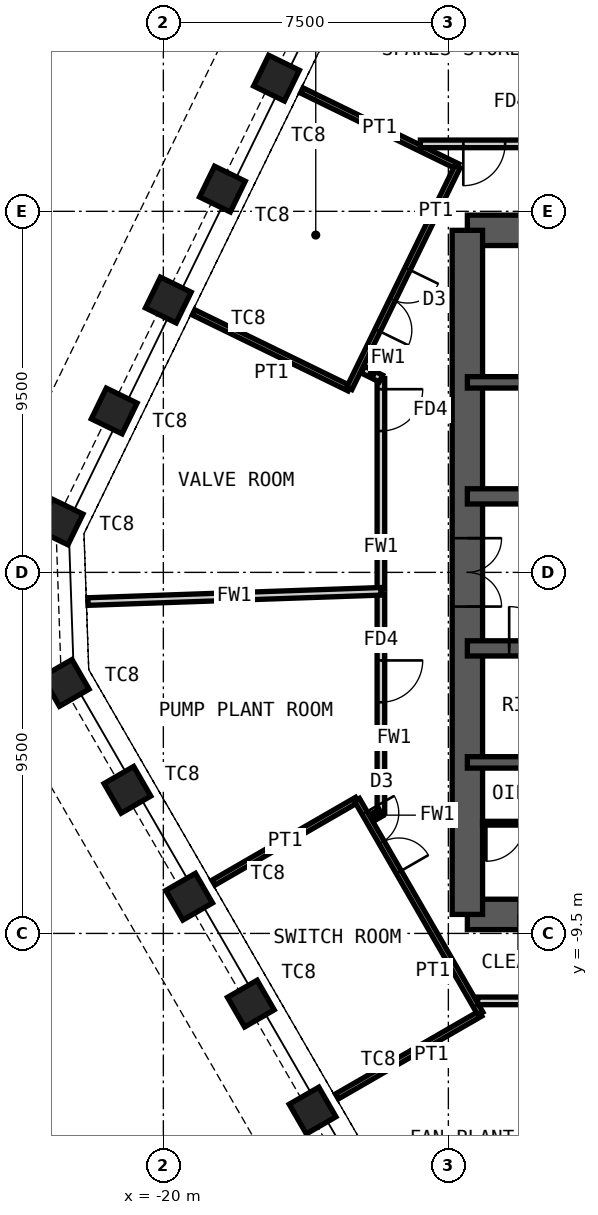
"""IFC4 building model, lengths in metres.
Left out: names, types, materials, properties, quantities, classifications, styles, units other than length and angle.
Written with IfcOpenShell. Run it as: python <this file> out.ifc"""

import sys

from ifc_helpers import new_model, si_unit, direction, frame, frame_2d, origin, origin_2d, place, context, subcontext, project, spatial, rectangle, hollow_rectangle, extrude, element, fill, save


model = new_model("IFC4")
c1 = context("Model", 3, precision=1e-05, world=origin(), true_north=direction((0.0, 1.0)))
c2 = subcontext(c1, "Body", "Model", "MODEL_VIEW")
j1 = project(units=[si_unit("LENGTHUNIT", "METRE"), si_unit("PLANEANGLEUNIT", "RADIAN")], contexts=[c1])
p1 = place(None, origin())
s1 = spatial("IfcSite", under=j1, at=p1, CompositionType="ELEMENT")
p2 = place(p1, origin())
s2 = spatial("IfcBuilding", under=s1, at=p2, CompositionType="ELEMENT")
p3 = place(p2, frame((0.0, 0.0, 337.6)))
s3 = spatial("IfcBuildingStorey", under=s2, at=p3, CompositionType="ELEMENT", Elevation=337.6)
for number, where, z_axis, x_axis in (
    (1, (-16.073, -14.16, 0.0), (0.0, 0.0, 1.0), (0.5, -0.866, 0.0)),
    (2, (-17.698, -11.347, 0.0), (0.0, 0.0, 1.0), (0.5, -0.866, 0.0)),
    (3, (-19.322, -8.534, 0.0), (0.0, 0.0, 1.0), (0.5, -0.866, 0.0)),
    (4, (-20.946, -5.721, 0.0), (0.0, 0.0, 1.0), (0.5, -0.866, 0.0)),
    (5, (-22.57, -2.908, 0.0), (0.0, 0.0, 1.0), (0.5, -0.866, 0.0)),
    (6, (-22.717, 1.327, 0.0), (0.0, 0.0, 1.0), (-0.438, -0.899, 0.0)),
    (7, (-21.293, 4.246, 0.0), (0.0, 0.0, 1.0), (-0.438, -0.899, 0.0)),
    (8, (-19.87, 7.166, 0.0), (0.0, 0.0, 1.0), (-0.438, -0.899, 0.0)),
    (9, (-18.446, 10.085, 0.0), (0.0, 0.0, 1.0), (-0.438, -0.899, 0.0)),
    (10, (-17.022, 13.004, 0.0), (0.0, 0.0, 1.0), (-0.438, -0.899, 0.0)),
):
    element("IfcColumn", number, at=place(p3, frame(where, z_axis=z_axis, x_axis=x_axis)), inside=s3, PredefinedType="COLUMN", context=c2, shape_type="SweptSolid", body=[
        extrude(hollow_rectangle(XDim=0.9, YDim=0.9, WallThickness=0.05, at=origin_2d()), origin(), (0.0, 0.0, 1.0), 6.0),
    ])
p4 = place(p3, frame((-12.0, 9.0, 0.0), z_axis=(0.0, 0.0, 1.0), x_axis=(1.0, 0.0, 0.0)))
e11 = element("IfcWall", 11, at=p4, inside=s3, PredefinedType="SHEAR", context=c2, shape_type="SweptSolid", body=[
    extrude(rectangle(XDim=24.0, YDim=0.8, at=frame_2d((12.0, 0.0))), origin(), (0.0, 0.0, 1.0), 6.0),
])
p5 = place(p4, frame((10.4, 0.0, 0.0)))
e12 = element("IfcOpeningElement", 12, at=p5, cuts=e11, PredefinedType="OPENING", context=c2, shape_type="SweptSolid", body=[
    extrude(rectangle(XDim=1.0, YDim=2.1, at=frame_2d((0.5, 1.05))), frame((0.0, 0.41, 0.0), z_axis=(0.0, -1.0, 0.0), x_axis=(1.0, 0.0, 0.0)), (0.0, 0.0, 1.0), 0.82),
])
p6 = place(p4, frame((17.6, 0.0, 0.0)))
e13 = element("IfcOpeningElement", 13, at=p6, cuts=e11, PredefinedType="OPENING", context=c2, shape_type="SweptSolid", body=[
    extrude(rectangle(XDim=0.9, YDim=2.1, at=frame_2d((0.45, 1.05))), frame((0.0, 0.41, 0.0), z_axis=(0.0, -1.0, 0.0), x_axis=(1.0, 0.0, 0.0)), (0.0, 0.0, 1.0), 0.82),
])
p7 = place(p4, frame((21.9, 0.0, 0.0)))
e14 = element("IfcOpeningElement", 14, at=p7, cuts=e11, PredefinedType="OPENING", context=c2, shape_type="SweptSolid", body=[
    extrude(rectangle(XDim=0.9, YDim=2.1, at=frame_2d((0.45, 1.05))), frame((0.0, 0.41, 0.0), z_axis=(0.0, -1.0, 0.0), x_axis=(1.0, 0.0, 0.0)), (0.0, 0.0, 1.0), 0.82),
])
p8 = place(p3, frame((-12.0, -9.0, 0.0), z_axis=(0.0, 0.0, 1.0), x_axis=(1.0, 0.0, 0.0)))
e15 = element("IfcWall", 15, at=p8, inside=s3, PredefinedType="SHEAR", context=c2, shape_type="SweptSolid", body=[
    extrude(rectangle(XDim=24.0, YDim=0.8, at=frame_2d((12.0, 0.0))), origin(), (0.0, 0.0, 1.0), 6.0),
])
p9 = place(p8, frame((1.35, 0.0, 0.0)))
e16 = element("IfcOpeningElement", 16, at=p9, cuts=e15, PredefinedType="OPENING", context=c2, shape_type="SweptSolid", body=[
    extrude(rectangle(XDim=1.0, YDim=2.1, at=frame_2d((0.5, 1.05))), frame((0.0, 0.41, 0.0), z_axis=(0.0, -1.0, 0.0), x_axis=(1.0, 0.0, 0.0)), (0.0, 0.0, 1.0), 0.82),
])
p10 = place(p8, frame((5.325, 0.0, 0.0)))
e17 = element("IfcOpeningElement", 17, at=p10, cuts=e15, PredefinedType="OPENING", context=c2, shape_type="SweptSolid", body=[
    extrude(rectangle(XDim=1.15, YDim=2.1, at=frame_2d((0.575, 1.05))), frame((0.0, 0.41, 0.0), z_axis=(0.0, -1.0, 0.0), x_axis=(1.0, 0.0, 0.0)), (0.0, 0.0, 1.0), 0.82),
])
p11 = place(p8, frame((12.6, 0.0, 0.0)))
e18 = element("IfcOpeningElement", 18, at=p11, cuts=e15, PredefinedType="OPENING", context=c2, shape_type="SweptSolid", body=[
    extrude(rectangle(XDim=1.0, YDim=2.1, at=frame_2d((0.5, 1.05))), frame((0.0, 0.41, 0.0), z_axis=(0.0, -1.0, 0.0), x_axis=(1.0, 0.0, 0.0)), (0.0, 0.0, 1.0), 0.82),
])
p12 = place(p3, frame((-12.0, -9.0, 0.0), z_axis=(0.0, 0.0, 1.0), x_axis=(0.0, 1.0, 0.0)))
e19 = element("IfcWall", 19, at=p12, inside=s3, PredefinedType="SHEAR", context=c2, shape_type="SweptSolid", body=[
    extrude(rectangle(XDim=18.0, YDim=0.8, at=frame_2d((9.0, 0.0))), origin(), (0.0, 0.0, 1.0), 6.0),
])
p13 = place(p12, frame((8.1, 0.0, 0.0)))
e20 = element("IfcOpeningElement", 20, at=p13, cuts=e19, PredefinedType="OPENING", context=c2, shape_type="SweptSolid", body=[
    extrude(rectangle(XDim=1.8, YDim=2.1, at=frame_2d((0.9, 1.05))), frame((0.0, 0.41, 0.0), z_axis=(0.0, -1.0, 0.0), x_axis=(1.0, 0.0, 0.0)), (0.0, 0.0, 1.0), 0.82),
])
p14 = place(p3, frame((-12.0, 5.0, 0.0), z_axis=(0.0, 0.0, 1.0), x_axis=(1.0, 0.0, 0.0)))
e21 = element("IfcWall", 21, at=p14, inside=s3, PredefinedType="SHEAR", context=c2, shape_type="SweptSolid", body=[
    extrude(rectangle(XDim=24.0, YDim=0.3, at=frame_2d((12.0, 0.0))), origin(), (0.0, 0.0, 1.0), 6.0),
])
p15 = place(p3, frame((-12.0, 2.0, 0.0), z_axis=(0.0, 0.0, 1.0), x_axis=(1.0, 0.0, 0.0)))
e22 = element("IfcWall", 22, at=p15, inside=s3, PredefinedType="SHEAR", context=c2, shape_type="SweptSolid", body=[
    extrude(rectangle(XDim=24.0, YDim=0.4, at=frame_2d((12.0, 0.0))), origin(), (0.0, 0.0, 1.0), 6.0),
])
p16 = place(p15, frame((2.4, 0.0, 0.0)))
e23 = element("IfcOpeningElement", 23, at=p16, cuts=e22, PredefinedType="OPENING", context=c2, shape_type="SweptSolid", body=[
    extrude(rectangle(XDim=1.1, YDim=2.1, at=frame_2d((0.55, 1.05))), frame((0.0, 0.21, 0.0), z_axis=(0.0, -1.0, 0.0), x_axis=(1.0, 0.0, 0.0)), (0.0, 0.0, 1.0), 0.42),
])
p17 = place(p15, frame((22.0, 0.0, 0.0)))
e24 = element("IfcOpeningElement", 24, at=p17, cuts=e22, PredefinedType="OPENING", context=c2, shape_type="SweptSolid", body=[
    extrude(rectangle(XDim=1.1, YDim=2.1, at=frame_2d((0.55, 1.05))), frame((0.0, 0.21, 0.0), z_axis=(0.0, -1.0, 0.0), x_axis=(1.0, 0.0, 0.0)), (0.0, 0.0, 1.0), 0.42),
])
p18 = place(p15, frame((10.15, 0.0, 0.0)))
e25 = element("IfcOpeningElement", 25, at=p18, cuts=e22, PredefinedType="OPENING", context=c2, shape_type="SweptSolid", body=[
    extrude(rectangle(XDim=1.0, YDim=2.1, at=frame_2d((0.5, 1.05))), frame((0.0, 0.21, 0.0), z_axis=(0.0, -1.0, 0.0), x_axis=(1.0, 0.0, 0.0)), (0.0, 0.0, 1.0), 0.42),
])
p19 = place(p15, frame((6.9, 0.0, 0.0)))
e26 = element("IfcOpeningElement", 26, at=p19, cuts=e22, PredefinedType="OPENING", context=c2, shape_type="SweptSolid", body=[
    extrude(rectangle(XDim=1.0, YDim=2.1, at=frame_2d((0.5, 1.05))), frame((0.0, 0.21, 0.0), z_axis=(0.0, -1.0, 0.0), x_axis=(1.0, 0.0, 0.0)), (0.0, 0.0, 1.0), 0.42),
])
p20 = place(p15, frame((19.0, 0.0, 0.0)))
e27 = element("IfcOpeningElement", 27, at=p20, cuts=e22, PredefinedType="OPENING", context=c2, shape_type="SweptSolid", body=[
    extrude(rectangle(XDim=1.0, YDim=2.1, at=frame_2d((0.5, 1.05))), frame((0.0, 0.21, 0.0), z_axis=(0.0, -1.0, 0.0), x_axis=(1.0, 0.0, 0.0)), (0.0, 0.0, 1.0), 0.42),
])
p21 = place(p3, frame((-12.0, -2.0, 0.0), z_axis=(0.0, 0.0, 1.0), x_axis=(1.0, 0.0, 0.0)))
e28 = element("IfcWall", 28, at=p21, inside=s3, PredefinedType="SHEAR", context=c2, shape_type="SweptSolid", body=[
    extrude(rectangle(XDim=24.0, YDim=0.4, at=frame_2d((12.0, 0.0))), origin(), (0.0, 0.0, 1.0), 6.0),
])
p22 = place(p21, frame((1.1, 0.0, 0.0)))
e29 = element("IfcOpeningElement", 29, at=p22, cuts=e28, PredefinedType="OPENING", context=c2, shape_type="SweptSolid", body=[
    extrude(rectangle(XDim=1.1, YDim=2.1, at=frame_2d((0.55, 1.05))), frame((0.0, 0.21, 0.0), z_axis=(0.0, -1.0, 0.0), x_axis=(1.0, 0.0, 0.0)), (0.0, 0.0, 1.0), 0.42),
])
p23 = place(p21, frame((13.55, 0.0, 0.0)))
e30 = element("IfcOpeningElement", 30, at=p23, cuts=e28, PredefinedType="OPENING", context=c2, shape_type="SweptSolid", body=[
    extrude(rectangle(XDim=1.1, YDim=2.1, at=frame_2d((0.55, 1.05))), frame((0.0, 0.21, 0.0), z_axis=(0.0, -1.0, 0.0), x_axis=(1.0, 0.0, 0.0)), (0.0, 0.0, 1.0), 0.42),
])
p24 = place(p21, frame((20.7, 0.0, 0.0)))
e31 = element("IfcOpeningElement", 31, at=p24, cuts=e28, PredefinedType="OPENING", context=c2, shape_type="SweptSolid", body=[
    extrude(rectangle(XDim=1.1, YDim=2.1, at=frame_2d((0.55, 1.05))), frame((0.0, 0.21, 0.0), z_axis=(0.0, -1.0, 0.0), x_axis=(1.0, 0.0, 0.0)), (0.0, 0.0, 1.0), 0.42),
])
p25 = place(p21, frame((4.0, 0.0, 0.0)))
e32 = element("IfcOpeningElement", 32, at=p25, cuts=e28, PredefinedType="OPENING", context=c2, shape_type="SweptSolid", body=[
    extrude(rectangle(XDim=1.0, YDim=2.1, at=frame_2d((0.5, 1.05))), frame((0.0, 0.21, 0.0), z_axis=(0.0, -1.0, 0.0), x_axis=(1.0, 0.0, 0.0)), (0.0, 0.0, 1.0), 0.42),
])
p26 = place(p21, frame((6.8, 0.0, 0.0)))
e33 = element("IfcOpeningElement", 33, at=p26, cuts=e28, PredefinedType="OPENING", context=c2, shape_type="SweptSolid", body=[
    extrude(rectangle(XDim=1.0, YDim=2.1, at=frame_2d((0.5, 1.05))), frame((0.0, 0.21, 0.0), z_axis=(0.0, -1.0, 0.0), x_axis=(1.0, 0.0, 0.0)), (0.0, 0.0, 1.0), 0.42),
])
p27 = place(p21, frame((9.6, 0.0, 0.0)))
e34 = element("IfcOpeningElement", 34, at=p27, cuts=e28, PredefinedType="OPENING", context=c2, shape_type="SweptSolid", body=[
    extrude(rectangle(XDim=1.0, YDim=2.1, at=frame_2d((0.5, 1.05))), frame((0.0, 0.21, 0.0), z_axis=(0.0, -1.0, 0.0), x_axis=(1.0, 0.0, 0.0)), (0.0, 0.0, 1.0), 0.42),
])
p28 = place(p3, frame((-12.0, -5.0, 0.0), z_axis=(0.0, 0.0, 1.0), x_axis=(1.0, 0.0, 0.0)))
e35 = element("IfcWall", 35, at=p28, inside=s3, PredefinedType="SHEAR", context=c2, shape_type="SweptSolid", body=[
    extrude(rectangle(XDim=24.0, YDim=0.3, at=frame_2d((12.0, 0.0))), origin(), (0.0, 0.0, 1.0), 6.0),
])
p29 = place(p3, frame((-11.6, -6.6, 0.0), z_axis=(0.0, 0.0, 1.0), x_axis=(1.0, 0.0, 0.0)))
e36 = element("IfcWall", 36, at=p29, inside=s3, PredefinedType="PARTITIONING", context=c2, shape_type="SweptSolid", body=[
    extrude(rectangle(XDim=3.25, YDim=0.1, at=frame_2d((1.625, 0.0))), origin(), (0.0, 0.0, 1.0), 5.78),
])
p30 = place(p29, frame((0.1, 0.0, 0.0)))
e37 = element("IfcOpeningElement", 37, at=p30, cuts=e36, PredefinedType="OPENING", context=c2, shape_type="SweptSolid", body=[
    extrude(rectangle(XDim=1.0, YDim=2.4, at=frame_2d((0.5, 1.2))), frame((0.0, 0.06, 0.0), z_axis=(0.0, -1.0, 0.0), x_axis=(1.0, 0.0, 0.0)), (0.0, 0.0, 1.0), 0.12),
])
for number, where, z_axis, x_axis in (
    (38, (-15.433, -13.79, 0.0), (0.0, 0.0, 1.0), (0.866, 0.5, 0.0)),
    (39, (-18.681, -8.164, 0.0), (0.0, 0.0, 1.0), (0.866, 0.5, 0.0)),
):
    element("IfcWall", number, at=place(p3, frame(where, z_axis=z_axis, x_axis=x_axis)), inside=s3, PredefinedType="PARTITIONING", context=c2, shape_type="SweptSolid", body=[
        extrude(rectangle(XDim=4.36, YDim=0.15, at=frame_2d((2.18, 0.0))), origin(), (0.0, 0.0, 1.0), 4.65),
    ])
p31 = place(p3, frame((-11.657, -11.61, 0.0), z_axis=(0.0, 0.0, 1.0), x_axis=(-0.500003318956, 0.866023487576, 0.0)))
e40 = element("IfcWall", 40, at=p31, inside=s3, PredefinedType="PARTITIONING", context=c2, shape_type="SweptSolid", body=[
    extrude(rectangle(XDim=6.496, YDim=0.15, at=frame_2d((3.248, 0.0))), origin(), (0.0, 0.0, 1.0), 5.75),
])
p32 = place(p31, frame((4.297, 0.0, 0.0)))
e41 = element("IfcOpeningElement", 41, at=p32, cuts=e40, PredefinedType="OPENING", context=c2, shape_type="SweptSolid", body=[
    extrude(rectangle(XDim=1.8, YDim=2.4, at=frame_2d((0.9, 1.2))), frame((0.0, 0.085, 0.0), z_axis=(0.0, -1.0, 0.0), x_axis=(1.0, 0.0, 0.0)), (0.0, 0.0, 1.0), 0.17),
])
p33 = place(p3, frame((-19.205, 6.841, 0.0), z_axis=(0.0, 0.0, 1.0), x_axis=(0.898784911103, -0.438389876221, 0.0)))
e42 = element("IfcWall", 42, at=p33, inside=s3, PredefinedType="PARTITIONING", context=c2, shape_type="SweptSolid", body=[
    extrude(rectangle(XDim=4.56, YDim=0.15, at=frame_2d((2.28, 0.0))), origin(), (0.0, 0.0, 1.0), 4.65),
])
p34 = place(p3, frame((-16.357, 12.68, 0.0), z_axis=(0.0, 0.0, 1.0), x_axis=(0.898795200085, -0.438368781171, 0.0)))
e43 = element("IfcWall", 43, at=p34, inside=s3, PredefinedType="PARTITIONING", context=c2, shape_type="SweptSolid", body=[
    extrude(rectangle(XDim=4.56, YDim=0.15, at=frame_2d((2.28, 0.0))), origin(), (0.0, 0.0, 1.0), 4.85),
])
p35 = place(p3, frame((-15.106, 4.842, 0.0), z_axis=(0.0, 0.0, 1.0), x_axis=(0.438397716114, 0.898781087087, 0.0)))
e44 = element("IfcWall", 44, at=p35, inside=s3, PredefinedType="PARTITIONING", context=c2, shape_type="SweptSolid", body=[
    extrude(rectangle(XDim=6.496, YDim=0.15, at=frame_2d((3.248, 0.0))), origin(), (0.0, 0.0, 1.0), 5.75),
])
p36 = place(p35, frame((1.698, 0.0, 0.0)))
e45 = element("IfcOpeningElement", 45, at=p36, cuts=e44, PredefinedType="OPENING", context=c2, shape_type="SweptSolid", body=[
    extrude(rectangle(XDim=1.8, YDim=2.4, at=frame_2d((0.9, 1.2))), frame((0.0, 0.085, 0.0), z_axis=(0.0, -1.0, 0.0), x_axis=(1.0, 0.0, 0.0)), (0.0, 0.0, 1.0), 0.17),
])
p37 = place(p3, frame((-14.275, -6.32, 0.0), z_axis=(0.0, 0.0, 1.0), x_axis=(0.0, 1.0, 0.0)))
e46 = element("IfcWall", 46, at=p37, inside=s3, PredefinedType="PARTITIONING", context=c2, shape_type="SweptSolid", body=[
    extrude(rectangle(XDim=5.755, YDim=0.2, at=frame_2d((2.877, 0.0))), origin(), (0.0, 0.0, 1.0), 5.75),
])
p38 = place(p37, frame((2.903, 0.0, 0.0)))
e47 = element("IfcOpeningElement", 47, at=p38, cuts=e46, PredefinedType="OPENING", context=c2, shape_type="SweptSolid", body=[
    extrude(rectangle(XDim=1.1, YDim=2.1, at=frame_2d((0.55, 1.05))), frame((0.0, 0.11, 0.0), z_axis=(0.0, -1.0, 0.0), x_axis=(1.0, 0.0, 0.0)), (0.0, 0.0, 1.0), 0.22),
])
p39 = place(p3, frame((-14.275, -6.32, 0.0), z_axis=(0.0, 0.0, 1.0), x_axis=(-0.866140847338, -0.499799992569, 0.0)))
e48 = element("IfcWall", 48, at=p39, inside=s3, PredefinedType="PARTITIONING", context=c2, shape_type="SweptSolid", body=[
    extrude(rectangle(XDim=0.272, YDim=0.2, at=frame_2d((0.136, 0.0))), origin(), (0.0, 0.0, 1.0), 5.75),
])
p40 = place(p3, frame((-6.074, -11.275, 0.0), z_axis=(0.0, 0.0, 1.0), x_axis=(-1.0, 0.0, 0.0)))
e49 = element("IfcWall", 49, at=p40, inside=s3, PredefinedType="PARTITIONING", context=c2, shape_type="SweptSolid", body=[
    extrude(rectangle(XDim=5.655, YDim=0.2, at=frame_2d((2.827, 0.0))), origin(), (0.0, 0.0, 1.0), 5.75),
])
p41 = place(p40, frame((3.408, 0.0, 0.0)))
e50 = element("IfcOpeningElement", 50, at=p41, cuts=e49, PredefinedType="OPENING", context=c2, shape_type="SweptSolid", body=[
    extrude(rectangle(XDim=1.1, YDim=2.1, at=frame_2d((0.55, 1.05))), frame((0.0, 0.11, 0.0), z_axis=(0.0, -1.0, 0.0), x_axis=(1.0, 0.0, 0.0)), (0.0, 0.0, 1.0), 0.22),
])
p42 = place(p3, frame((-13.237, 11.275, 0.0), z_axis=(0.0, 0.0, 1.0), x_axis=(1.0, 0.0, 0.0)))
e51 = element("IfcWall", 51, at=p42, inside=s3, PredefinedType="PARTITIONING", context=c2, shape_type="SweptSolid", body=[
    extrude(rectangle(XDim=6.109, YDim=0.2, at=frame_2d((3.054, 0.0))), origin(), (0.0, 0.0, 1.0), 5.75),
])
p43 = place(p42, frame((1.13, 0.0, 0.0)))
e52 = element("IfcOpeningElement", 52, at=p43, cuts=e51, PredefinedType="OPENING", context=c2, shape_type="SweptSolid", body=[
    extrude(rectangle(XDim=1.1, YDim=2.1, at=frame_2d((0.55, 1.05))), frame((0.0, 0.11, 0.0), z_axis=(0.0, -1.0, 0.0), x_axis=(1.0, 0.0, 0.0)), (0.0, 0.0, 1.0), 0.22),
])
p44 = place(p3, frame((-14.275, -0.432, 0.0), z_axis=(0.0, 0.0, 1.0), x_axis=(0.0, 1.0, 0.0)))
e53 = element("IfcWall", 53, at=p44, inside=s3, PredefinedType="PARTITIONING", context=c2, shape_type="SweptSolid", body=[
    extrude(rectangle(XDim=5.532, YDim=0.2, at=frame_2d((2.766, 0.0))), origin(), (0.0, 0.0, 1.0), 5.75),
])
p45 = place(p44, frame((4.152, 0.0, 0.0)))
e54 = element("IfcOpeningElement", 54, at=p45, cuts=e53, PredefinedType="OPENING", context=c2, shape_type="SweptSolid", body=[
    extrude(rectangle(XDim=1.1, YDim=2.1, at=frame_2d((0.55, 1.05))), frame((0.0, 0.11, 0.0), z_axis=(0.0, -1.0, 0.0), x_axis=(1.0, 0.0, 0.0)), (0.0, 0.0, 1.0), 0.22),
])
p46 = place(p3, frame((-14.275, 5.1, 0.0), z_axis=(0.0, 0.0, 1.0), x_axis=(-0.894980101655, 0.446106060979, 0.0)))
e55 = element("IfcWall", 55, at=p46, inside=s3, PredefinedType="PARTITIONING", context=c2, shape_type="SweptSolid", body=[
    extrude(rectangle(XDim=0.529, YDim=0.2, at=frame_2d((0.265, 0.0))), origin(), (0.0, 0.0, 1.0), 4.65),
])
p47 = place(p3, frame((-5.995, -11.275, 0.0), z_axis=(0.0, 0.0, 1.0), x_axis=(-0.4694648611, -0.882951156176, 0.0)))
e56 = element("IfcWall", 56, at=p47, inside=s3, PredefinedType="PARTITIONING", context=c2, shape_type="SweptSolid", body=[
    extrude(rectangle(XDim=10.088, YDim=0.2, at=frame_2d((5.044, 0.0))), origin(), (0.0, 0.0, 1.0), 5.75),
])
p48 = place(p3, frame((-14.275, -0.499, 0.0), z_axis=(0.0, 0.0, 1.0), x_axis=(-0.999390758133, -0.034901469295, 0.0)))
e57 = element("IfcWall", 57, at=p48, inside=s3, PredefinedType="PARTITIONING", context=c2, shape_type="SweptSolid", body=[
    extrude(rectangle(XDim=7.716, YDim=0.2, at=frame_2d((3.858, 0.0))), origin(), (0.0, 0.0, 1.0), 5.75),
])
p49 = place(p3, frame((-7.045, 11.275, 0.0), z_axis=(0.0, 0.0, 1.0), x_axis=(-0.529918611936, 0.848048503756, 0.0)))
e58 = element("IfcWall", 58, at=p49, inside=s3, PredefinedType="PARTITIONING", context=c2, shape_type="SweptSolid", body=[
    extrude(rectangle(XDim=9.562, YDim=0.2, at=frame_2d((4.781, 0.0))), origin(), (0.0, 0.0, 1.0), 5.75),
])
p50 = place(p22, origin())
e59 = element("IfcDoor", 59, at=p50, inside=s3, OperationType="SINGLE_SWING_RIGHT", PredefinedType="DOOR", context=c2, shape_type="SweptSolid", body=[
    extrude(rectangle(XDim=1.1, YDim=2.1, at=frame_2d((0.55, 1.05))), frame((0.0, 0.025, 0.0), z_axis=(0.0, -1.0, 0.0), x_axis=(1.0, 0.0, 0.0)), (0.0, 0.0, 1.0), 0.05),
])
fill(e29, e59)
p51 = place(p13, origin())
e60 = element("IfcDoor", 60, at=p51, inside=s3, OperationType="DOUBLE_DOOR_DOUBLE_SWING", PredefinedType="DOOR", context=c2, shape_type="SweptSolid", body=[
    extrude(rectangle(XDim=1.8, YDim=2.1, at=frame_2d((0.9, 1.05))), frame((0.0, 0.025, 0.0), z_axis=(0.0, -1.0, 0.0), x_axis=(1.0, 0.0, 0.0)), (0.0, 0.0, 1.0), 0.05),
])
fill(e20, e60)
p52 = place(p30, origin())
e61 = element("IfcDoor", 61, at=p52, inside=s3, OperationType="SINGLE_SWING_LEFT", PredefinedType="DOOR", context=c2, shape_type="SweptSolid", body=[
    extrude(rectangle(XDim=1.0, YDim=2.4, at=frame_2d((0.5, 1.2))), frame((0.0, 0.025, 0.0), z_axis=(0.0, -1.0, 0.0), x_axis=(1.0, 0.0, 0.0)), (0.0, 0.0, 1.0), 0.05),
])
fill(e37, e61)
p53 = place(p32, origin())
e62 = element("IfcDoor", 62, at=p53, inside=s3, OperationType="DOUBLE_DOOR_DOUBLE_SWING", PredefinedType="DOOR", context=c2, shape_type="SweptSolid", body=[
    extrude(rectangle(XDim=1.8, YDim=2.4, at=frame_2d((0.9, 1.2))), frame((0.0, 0.025, 0.0), z_axis=(0.0, -1.0, 0.0), x_axis=(1.0, 0.0, 0.0)), (0.0, 0.0, 1.0), 0.05),
])
fill(e41, e62)
p54 = place(p36, origin())
e63 = element("IfcDoor", 63, at=p54, inside=s3, OperationType="DOUBLE_DOOR_DOUBLE_SWING", PredefinedType="DOOR", context=c2, shape_type="SweptSolid", body=[
    extrude(rectangle(XDim=1.8, YDim=2.4, at=frame_2d((0.9, 1.2))), frame((0.0, 0.025, 0.0), z_axis=(0.0, -1.0, 0.0), x_axis=(1.0, 0.0, 0.0)), (0.0, 0.0, 1.0), 0.05),
])
fill(e45, e63)
p55 = place(p38, origin())
e64 = element("IfcDoor", 64, at=p55, inside=s3, OperationType="SINGLE_SWING_RIGHT", PredefinedType="DOOR", context=c2, shape_type="SweptSolid", body=[
    extrude(rectangle(XDim=1.1, YDim=2.1, at=frame_2d((0.55, 1.05))), frame((0.0, 0.025, 0.0), z_axis=(0.0, -1.0, 0.0), x_axis=(1.0, 0.0, 0.0)), (0.0, 0.0, 1.0), 0.05),
])
fill(e47, e64)
p56 = place(p43, origin())
e65 = element("IfcDoor", 65, at=p56, inside=s3, OperationType="SINGLE_SWING_LEFT", PredefinedType="DOOR", context=c2, shape_type="SweptSolid", body=[
    extrude(rectangle(XDim=1.1, YDim=2.1, at=frame_2d((0.55, 1.05))), frame((0.0, 0.025, 0.0), z_axis=(0.0, -1.0, 0.0), x_axis=(1.0, 0.0, 0.0)), (0.0, 0.0, 1.0), 0.05),
])
fill(e52, e65)
p57 = place(p45, origin())
e66 = element("IfcDoor", 66, at=p57, inside=s3, OperationType="SINGLE_SWING_RIGHT", PredefinedType="DOOR", context=c2, shape_type="SweptSolid", body=[
    extrude(rectangle(XDim=1.1, YDim=2.1, at=frame_2d((0.55, 1.05))), frame((0.0, 0.025, 0.0), z_axis=(0.0, -1.0, 0.0), x_axis=(1.0, 0.0, 0.0)), (0.0, 0.0, 1.0), 0.05),
])
fill(e54, e66)
save(model, sys.argv[1])
